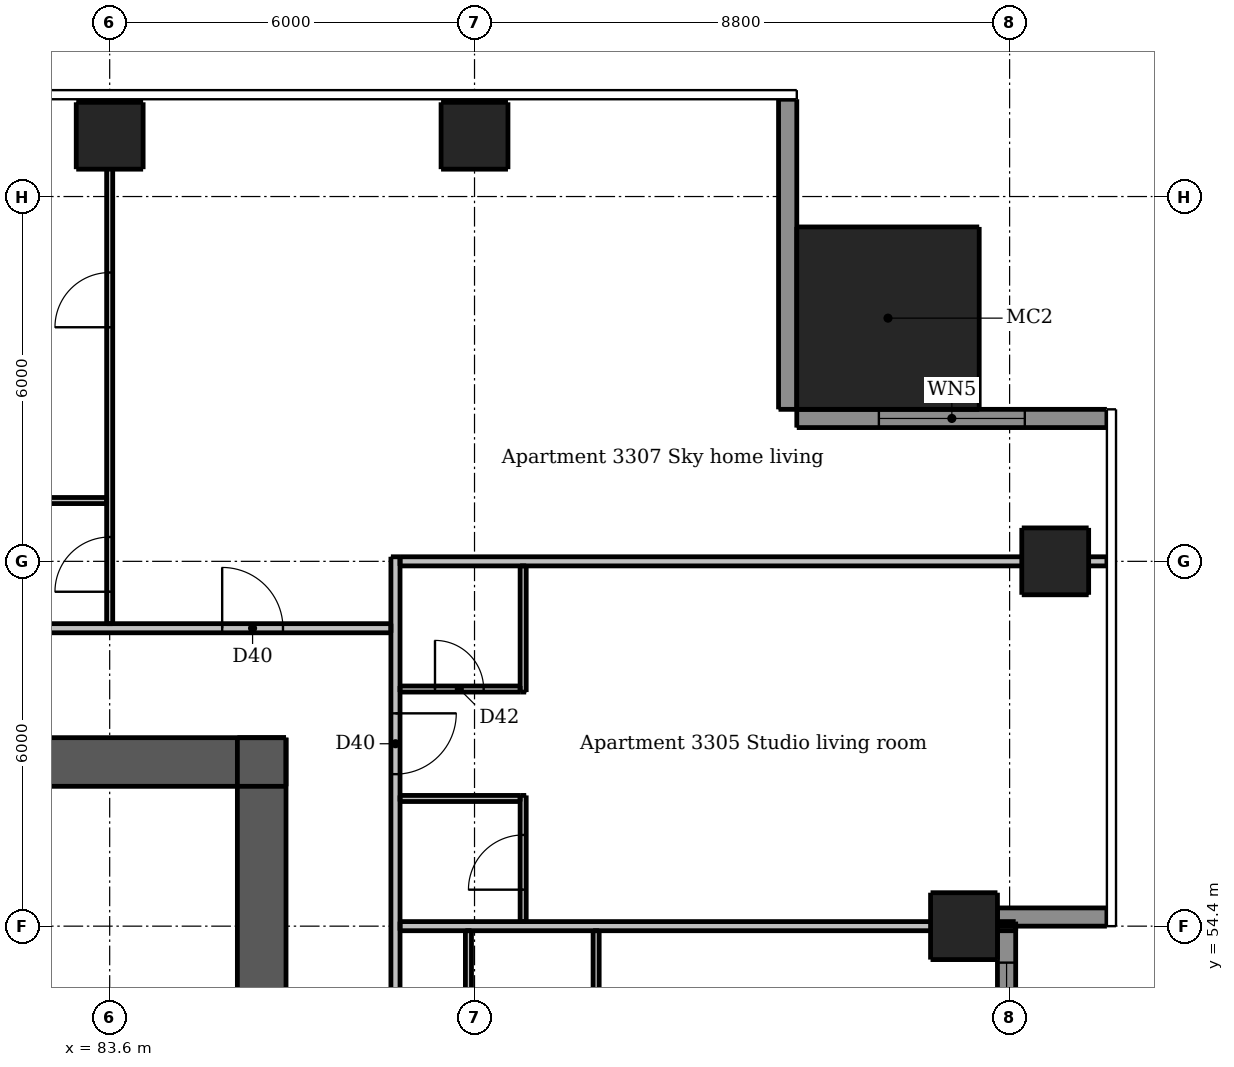
"""IFC4 building model, lengths in metres.
Left out: names, types, materials, properties, quantities, classifications, styles, units other than length and angle.
Written with IfcOpenShell. Run it as: python <this file> out.ifc"""

import sys

from ifc_helpers import new_model, si_unit, direction, frame, frame_2d, origin, origin_2d, place, context, subcontext, project, spatial, rectangle, extrude, element, fill, save


model = new_model("IFC4")
c1 = context("Model", 3, precision=1e-05, world=origin(), true_north=direction((0.0, 1.0)))
c2 = subcontext(c1, "Body", "Model", "MODEL_VIEW")
j1 = project(units=[si_unit("LENGTHUNIT", "METRE"), si_unit("PLANEANGLEUNIT", "RADIAN")], contexts=[c1])
p1 = place(None, origin())
s1 = spatial("IfcSite", under=j1, at=p1, CompositionType="ELEMENT")
p2 = place(p1, origin())
s2 = spatial("IfcBuilding", under=s1, at=p2, CompositionType="ELEMENT")
p3 = place(p2, frame((0.0, 0.0, 121.6)))
s3 = spatial("IfcBuildingStorey", under=s2, at=p3, CompositionType="ELEMENT", Elevation=121.6)
p4 = place(p3, frame((62.5, 57.1, 0.0), z_axis=(0.0, 0.0, 1.0), x_axis=(1.0, 0.0, 0.0)))
e1 = element("IfcWall", 1, at=p4, inside=s3, PredefinedType="SHEAR", context=c2, shape_type="SweptSolid", body=[
    extrude(rectangle(XDim=24.0, YDim=0.8, at=frame_2d((12.0, 0.0))), origin(), (0.0, 0.0, 1.0), 2.95),
])
p5 = place(p4, frame((20.9, 0.0, 0.0)))
e2 = element("IfcOpeningElement", 2, at=p5, cuts=e1, PredefinedType="OPENING", context=c2, shape_type="SweptSolid", body=[
    extrude(rectangle(XDim=1.1, YDim=2.1, at=frame_2d((0.55, 1.05))), frame((0.0, 0.41, 0.0), z_axis=(0.0, -1.0, 0.0), x_axis=(1.0, 0.0, 0.0)), (0.0, 0.0, 1.0), 0.82),
])
p6 = place(p4, frame((2.0, 0.0, 0.0)))
e3 = element("IfcOpeningElement", 3, at=p6, cuts=e1, PredefinedType="OPENING", context=c2, shape_type="SweptSolid", body=[
    extrude(rectangle(XDim=1.1, YDim=2.1, at=frame_2d((0.55, 1.05))), frame((0.0, 0.41, 0.0), z_axis=(0.0, -1.0, 0.0), x_axis=(1.0, 0.0, 0.0)), (0.0, 0.0, 1.0), 0.82),
])
p7 = place(p4, frame((6.075, 0.0, 0.0)))
e4 = element("IfcOpeningElement", 4, at=p7, cuts=e1, PredefinedType="OPENING", context=c2, shape_type="SweptSolid", body=[
    extrude(rectangle(XDim=0.9, YDim=2.1, at=frame_2d((0.45, 1.05))), frame((0.0, 0.41, 0.0), z_axis=(0.0, -1.0, 0.0), x_axis=(1.0, 0.0, 0.0)), (0.0, 0.0, 1.0), 0.82),
])
p8 = place(p4, frame((10.455, 0.0, 0.0)))
e5 = element("IfcOpeningElement", 5, at=p8, cuts=e1, PredefinedType="OPENING", context=c2, shape_type="SweptSolid", body=[
    extrude(rectangle(XDim=0.9, YDim=2.1, at=frame_2d((0.45, 1.05))), frame((0.0, 0.41, 0.0), z_axis=(0.0, -1.0, 0.0), x_axis=(1.0, 0.0, 0.0)), (0.0, 0.0, 1.0), 0.82),
])
p9 = place(p4, frame((15.93, 0.0, 0.0)))
e6 = element("IfcOpeningElement", 6, at=p9, cuts=e1, PredefinedType="OPENING", context=c2, shape_type="SweptSolid", body=[
    extrude(rectangle(XDim=0.9, YDim=2.1, at=frame_2d((0.45, 1.05))), frame((0.0, 0.41, 0.0), z_axis=(0.0, -1.0, 0.0), x_axis=(1.0, 0.0, 0.0)), (0.0, 0.0, 1.0), 0.82),
])
p10 = place(p3, frame((86.1, 33.5, 0.0), z_axis=(0.0, 0.0, 1.0), x_axis=(0.0, 1.0, 0.0)))
e7 = element("IfcWall", 7, at=p10, inside=s3, PredefinedType="SHEAR", context=c2, shape_type="SweptSolid", body=[
    extrude(rectangle(XDim=24.0, YDim=0.8, at=frame_2d((12.0, 0.0))), origin(), (0.0, 0.0, 1.0), 2.95),
])
p11 = place(p10, frame((11.2, 0.0, 0.0)))
e8 = element("IfcOpeningElement", 8, at=p11, cuts=e7, PredefinedType="OPENING", context=c2, shape_type="SweptSolid", body=[
    extrude(rectangle(XDim=1.6, YDim=2.1, at=frame_2d((0.8, 1.05))), frame((0.0, 0.41, 0.0), z_axis=(0.0, -1.0, 0.0), x_axis=(1.0, 0.0, 0.0)), (0.0, 0.0, 1.0), 0.82),
])
for number, where, z_axis, x_axis in (
    (9, (97.65, 54.4, 0.0), (0.0, 0.0, 1.0), (1.0, 0.0, 0.0)),
    (10, (99.15, 60.4, 0.0), (0.0, 0.0, 1.0), (1.0, 0.0, 0.0)),
    (11, (83.6, 67.4, 0.0), (0.0, 0.0, 1.0), (1.0, 0.0, 0.0)),
    (12, (89.6, 67.4, 0.0), (0.0, 0.0, 1.0), (1.0, 0.0, 0.0)),
):
    element("IfcColumn", number, at=place(p3, frame(where, z_axis=z_axis, x_axis=x_axis)), inside=s3, PredefinedType="COLUMN", context=c2, shape_type="SweptSolid", body=[
        extrude(rectangle(XDim=1.1, YDim=1.1, at=origin_2d()), origin(), (0.0, 0.0, 1.0), 2.95),
    ])
p12 = place(p3, frame((96.4, 64.4, 0.0), z_axis=(0.0, 0.0, 1.0), x_axis=(1.0, 0.0, 0.0)))
e13 = element("IfcColumn", 13, at=p12, inside=s3, PredefinedType="COLUMN", context=c2, shape_type="SweptSolid", body=[
    extrude(rectangle(XDim=3.0, YDim=3.0, at=origin_2d()), origin(), (0.0, 0.0, 1.0), 3.3),
])
p13 = place(p3, frame((98.2, 54.55, 0.0), z_axis=(0.0, 0.0, 1.0), x_axis=(1.0, 0.0, 0.0)))
e14 = element("IfcWall", 14, at=p13, inside=s3, PredefinedType="SOLIDWALL", context=c2, shape_type="SweptSolid", body=[
    extrude(rectangle(XDim=1.8, YDim=0.3, at=frame_2d((0.9, 0.0))), origin(), (0.0, 0.0, 1.0), 2.95),
])
p14 = place(p3, frame((100.0, 62.75, 0.0), z_axis=(0.0, 0.0, 1.0), x_axis=(-1.0, 0.0, 0.0)))
e15 = element("IfcWall", 15, at=p14, inside=s3, PredefinedType="SOLIDWALL", context=c2, shape_type="SweptSolid", body=[
    extrude(rectangle(XDim=5.1, YDim=0.3, at=frame_2d((2.55, 0.0))), origin(), (0.0, 0.0, 1.0), 2.95),
])
p15 = place(p14, frame((1.35, 0.0, 0.15)))
e16 = element("IfcOpeningElement", 16, at=p15, cuts=e15, PredefinedType="OPENING", context=c2, shape_type="SweptSolid", body=[
    extrude(rectangle(XDim=2.4, YDim=2.1, at=frame_2d((1.2, 1.05))), frame((0.0, 0.16, 0.0), z_axis=(0.0, -1.0, 0.0), x_axis=(1.0, 0.0, 0.0)), (0.0, 0.0, 1.0), 0.32),
])
p16 = place(p3, frame((94.75, 62.9, 0.0), z_axis=(0.0, 0.0, 1.0), x_axis=(0.0, 1.0, 0.0)))
e17 = element("IfcWall", 17, at=p16, inside=s3, PredefinedType="SOLIDWALL", context=c2, shape_type="SweptSolid", body=[
    extrude(rectangle(XDim=5.1, YDim=0.3, at=frame_2d((2.55, 0.0))), origin(), (0.0, 0.0, 1.0), 2.95),
])
p17 = place(p3, frame((98.35, 48.4, 0.0), z_axis=(0.0, 0.0, 1.0), x_axis=(0.0, 1.0, 0.0)))
e18 = element("IfcWall", 18, at=p17, inside=s3, PredefinedType="SOLIDWALL", context=c2, shape_type="SweptSolid", body=[
    extrude(rectangle(XDim=6.0, YDim=0.3, at=frame_2d((3.0, 0.0))), origin(), (0.0, 0.0, 1.0), 2.34),
])
p18 = place(p17, frame((0.6, 0.0, 0.15)))
e19 = element("IfcOpeningElement", 19, at=p18, cuts=e18, PredefinedType="OPENING", context=c2, shape_type="SweptSolid", body=[
    extrude(rectangle(XDim=1.8, YDim=2.1, at=frame_2d((0.9, 1.05))), frame((0.0, 0.16, 0.0), z_axis=(0.0, -1.0, 0.0), x_axis=(1.0, 0.0, 0.0)), (0.0, 0.0, 1.0), 0.32),
])
p19 = place(p17, frame((3.6, 0.0, 0.15)))
e20 = element("IfcOpeningElement", 20, at=p19, cuts=e18, PredefinedType="OPENING", context=c2, shape_type="SweptSolid", body=[
    extrude(rectangle(XDim=1.8, YDim=2.1, at=frame_2d((0.9, 1.05))), frame((0.0, 0.16, 0.0), z_axis=(0.0, -1.0, 0.0), x_axis=(1.0, 0.0, 0.0)), (0.0, 0.0, 1.0), 0.32),
])
p20 = place(p3, frame((83.6, 59.375, 0.0), z_axis=(0.0, 0.0, 1.0), x_axis=(0.0, 1.0, 0.0)))
e21 = element("IfcWall", 21, at=p20, inside=s3, PredefinedType="PARTITIONING", context=c2, shape_type="SweptSolid", body=[
    extrude(rectangle(XDim=8.625, YDim=0.1, at=frame_2d((4.312, 0.0))), origin(), (0.0, 0.0, 1.0), 2.332),
])
p21 = place(p20, frame((0.525, 0.0, 0.0)))
e22 = element("IfcOpeningElement", 22, at=p21, cuts=e21, PredefinedType="OPENING", context=c2, shape_type="SweptSolid", body=[
    extrude(rectangle(XDim=0.9, YDim=2.1, at=frame_2d((0.45, 1.05))), frame((0.0, 0.06, 0.0), z_axis=(0.0, -1.0, 0.0), x_axis=(1.0, 0.0, 0.0)), (0.0, 0.0, 1.0), 0.12),
])
p22 = place(p20, frame((4.875, 0.0, 0.0)))
e23 = element("IfcOpeningElement", 23, at=p22, cuts=e21, PredefinedType="OPENING", context=c2, shape_type="SweptSolid", body=[
    extrude(rectangle(XDim=0.9, YDim=2.1, at=frame_2d((0.45, 1.05))), frame((0.0, 0.06, 0.0), z_axis=(0.0, -1.0, 0.0), x_axis=(1.0, 0.0, 0.0)), (0.0, 0.0, 1.0), 0.12),
])
p23 = place(p3, frame((89.5, 54.325, 0.0), z_axis=(0.0, 0.0, 1.0), x_axis=(0.0, -1.0, 0.0)))
e24 = element("IfcWall", 24, at=p23, inside=s3, PredefinedType="PARTITIONING", context=c2, shape_type="SweptSolid", body=[
    extrude(rectangle(XDim=14.85, YDim=0.1, at=frame_2d((7.425, 0.0))), origin(), (0.0, 0.0, 1.0), 2.95),
])
p24 = place(p23, frame((5.775, 0.0, 0.0)))
e25 = element("IfcOpeningElement", 25, at=p24, cuts=e24, PredefinedType="OPENING", context=c2, shape_type="SweptSolid", body=[
    extrude(rectangle(XDim=0.9, YDim=2.1, at=frame_2d((0.45, 1.05))), frame((0.0, 0.06, 0.0), z_axis=(0.0, -1.0, 0.0), x_axis=(1.0, 0.0, 0.0)), (0.0, 0.0, 1.0), 0.12),
])
p25 = place(p23, frame((0.975, 0.0, 0.0)))
e26 = element("IfcOpeningElement", 26, at=p25, cuts=e24, PredefinedType="OPENING", context=c2, shape_type="SweptSolid", body=[
    extrude(rectangle(XDim=0.9, YDim=2.1, at=frame_2d((0.45, 1.05))), frame((0.0, 0.06, 0.0), z_axis=(0.0, -1.0, 0.0), x_axis=(1.0, 0.0, 0.0)), (0.0, 0.0, 1.0), 0.12),
])
p26 = place(p23, frame((12.975, 0.0, 0.0)))
e27 = element("IfcOpeningElement", 27, at=p26, cuts=e24, PredefinedType="OPENING", context=c2, shape_type="SweptSolid", body=[
    extrude(rectangle(XDim=0.9, YDim=2.1, at=frame_2d((0.45, 1.05))), frame((0.0, 0.06, 0.0), z_axis=(0.0, -1.0, 0.0), x_axis=(1.0, 0.0, 0.0)), (0.0, 0.0, 1.0), 0.12),
])
p27 = place(p23, frame((10.325, 0.0, 0.0)))
e28 = element("IfcOpeningElement", 28, at=p27, cuts=e24, PredefinedType="OPENING", context=c2, shape_type="SweptSolid", body=[
    extrude(rectangle(XDim=0.8, YDim=2.1, at=frame_2d((0.4, 1.05))), frame((0.0, 0.06, 0.0), z_axis=(0.0, -1.0, 0.0), x_axis=(1.0, 0.0, 0.0)), (0.0, 0.0, 1.0), 0.12),
])
p28 = place(p3, frame((90.4, 54.475, 0.0), z_axis=(0.0, 0.0, 1.0), x_axis=(0.0, 1.0, 0.0)))
e29 = element("IfcWall", 29, at=p28, inside=s3, PredefinedType="PARTITIONING", context=c2, shape_type="SweptSolid", body=[
    extrude(rectangle(XDim=2.075, YDim=0.1, at=frame_2d((1.038, 0.0))), origin(), (0.0, 0.0, 1.0), 2.95),
])
p29 = place(p28, frame((0.525, 0.0, 0.0)))
e30 = element("IfcOpeningElement", 30, at=p29, cuts=e29, PredefinedType="OPENING", context=c2, shape_type="SweptSolid", body=[
    extrude(rectangle(XDim=0.9, YDim=2.1, at=frame_2d((0.45, 1.05))), frame((0.0, 0.06, 0.0), z_axis=(0.0, -1.0, 0.0), x_axis=(1.0, 0.0, 0.0)), (0.0, 0.0, 1.0), 0.12),
])
p30 = place(p3, frame((90.4, 58.25, 0.0), z_axis=(0.0, 0.0, 1.0), x_axis=(0.0, 1.0, 0.0)))
e31 = element("IfcWall", 31, at=p30, inside=s3, PredefinedType="PARTITIONING", context=c2, shape_type="SweptSolid", body=[
    extrude(rectangle(XDim=2.075, YDim=0.1, at=frame_2d((1.038, 0.0))), origin(), (0.0, 0.0, 1.0), 2.95),
])
p31 = place(p3, frame((91.6, 51.35, 0.0), z_axis=(0.0, 0.0, 1.0), x_axis=(0.0, 1.0, 0.0)))
e32 = element("IfcWall", 32, at=p31, inside=s3, PredefinedType="PARTITIONING", context=c2, shape_type="SweptSolid", body=[
    extrude(rectangle(XDim=2.975, YDim=0.1, at=frame_2d((1.487, 0.0))), origin(), (0.0, 0.0, 1.0), 2.95),
])
p32 = place(p3, frame((83.55, 61.4, 0.0), z_axis=(0.0, 0.0, 1.0), x_axis=(-1.0, 0.0, 0.0)))
e33 = element("IfcWall", 33, at=p32, inside=s3, PredefinedType="PARTITIONING", context=c2, shape_type="SweptSolid", body=[
    extrude(rectangle(XDim=5.875, YDim=0.1, at=frame_2d((2.938, 0.0))), origin(), (0.0, 0.0, 1.0), 2.95),
])
p33 = place(p32, frame((3.75, 0.0, 0.0)))
e34 = element("IfcOpeningElement", 34, at=p33, cuts=e33, PredefinedType="OPENING", context=c2, shape_type="SweptSolid", body=[
    extrude(rectangle(XDim=0.8, YDim=2.1, at=frame_2d((0.4, 1.05))), frame((0.0, 0.06, 0.0), z_axis=(0.0, -1.0, 0.0), x_axis=(1.0, 0.0, 0.0)), (0.0, 0.0, 1.0), 0.12),
])
p34 = place(p3, frame((88.375, 58.3, 0.0), z_axis=(0.0, 0.0, 1.0), x_axis=(1.0, 0.0, 0.0)))
e35 = element("IfcWall", 35, at=p34, inside=s3, PredefinedType="PARTITIONING", context=c2, shape_type="SweptSolid", body=[
    extrude(rectangle(XDim=1.975, YDim=0.1, at=frame_2d((0.988, 0.0))), origin(), (0.0, 0.0, 1.0), 2.95),
])
p35 = place(p34, frame((0.575, 0.0, 0.0)))
e36 = element("IfcOpeningElement", 36, at=p35, cuts=e35, PredefinedType="OPENING", context=c2, shape_type="SweptSolid", body=[
    extrude(rectangle(XDim=0.8, YDim=2.1, at=frame_2d((0.4, 1.05))), frame((0.0, 0.06, 0.0), z_axis=(0.0, -1.0, 0.0), x_axis=(1.0, 0.0, 0.0)), (0.0, 0.0, 1.0), 0.12),
])
p36 = place(p3, frame((88.375, 56.5, 0.0), z_axis=(0.0, 0.0, 1.0), x_axis=(1.0, 0.0, 0.0)))
e37 = element("IfcWall", 37, at=p36, inside=s3, PredefinedType="PARTITIONING", context=c2, shape_type="SweptSolid", body=[
    extrude(rectangle(XDim=1.975, YDim=0.1, at=frame_2d((0.988, 0.0))), origin(), (0.0, 0.0, 1.0), 2.95),
])
p37 = place(p3, frame((88.3, 60.475, 0.0), z_axis=(0.0, 0.0, 1.0), x_axis=(0.0, -1.0, 0.0)))
e38 = element("IfcWall", 38, at=p37, inside=s3, PredefinedType="PARTITIONING", context=c2, shape_type="SweptSolid", body=[
    extrude(rectangle(XDim=28.7, YDim=0.15, at=frame_2d((14.35, 0.0))), origin(), (0.0, 0.0, 1.0), 2.95),
])
p38 = place(p37, frame((27.425, 0.0, 0.0)))
e39 = element("IfcOpeningElement", 39, at=p38, cuts=e38, PredefinedType="OPENING", context=c2, shape_type="SweptSolid", body=[
    extrude(rectangle(XDim=1.0, YDim=2.1, at=frame_2d((0.5, 1.05))), frame((0.0, 0.085, 0.0), z_axis=(0.0, -1.0, 0.0), x_axis=(1.0, 0.0, 0.0)), (0.0, 0.0, 1.0), 0.17),
])
p39 = place(p37, frame((13.075, 0.0, 0.0)))
e40 = element("IfcOpeningElement", 40, at=p39, cuts=e38, PredefinedType="OPENING", context=c2, shape_type="SweptSolid", body=[
    extrude(rectangle(XDim=1.0, YDim=2.1, at=frame_2d((0.5, 1.05))), frame((0.0, 0.085, 0.0), z_axis=(0.0, -1.0, 0.0), x_axis=(1.0, 0.0, 0.0)), (0.0, 0.0, 1.0), 0.17),
])
p40 = place(p37, frame((2.575, 0.0, 0.0)))
e41 = element("IfcOpeningElement", 41, at=p40, cuts=e38, PredefinedType="OPENING", context=c2, shape_type="SweptSolid", body=[
    extrude(rectangle(XDim=1.0, YDim=2.1, at=frame_2d((0.5, 1.05))), frame((0.0, 0.085, 0.0), z_axis=(0.0, -1.0, 0.0), x_axis=(1.0, 0.0, 0.0)), (0.0, 0.0, 1.0), 0.17),
])
p41 = place(p3, frame((88.375, 60.4, 0.0), z_axis=(0.0, 0.0, 1.0), x_axis=(1.0, 0.0, 0.0)))
e42 = element("IfcWall", 42, at=p41, inside=s3, PredefinedType="PARTITIONING", context=c2, shape_type="SweptSolid", body=[
    extrude(rectangle(XDim=11.625, YDim=0.15, at=frame_2d((5.812, 0.0))), origin(), (0.0, 0.0, 1.0), 2.332),
])
p42 = place(p3, frame((59.675, 59.3, 0.0), z_axis=(0.0, 0.0, 1.0), x_axis=(1.0, 0.0, 0.0)))
e43 = element("IfcWall", 43, at=p42, inside=s3, PredefinedType="PARTITIONING", context=c2, shape_type="SweptSolid", body=[
    extrude(rectangle(XDim=28.55, YDim=0.15, at=frame_2d((14.275, 0.0))), origin(), (0.0, 0.0, 1.0), 2.95),
])
p43 = place(p42, frame((8.975, 0.0, 0.0)))
e44 = element("IfcOpeningElement", 44, at=p43, cuts=e43, PredefinedType="OPENING", context=c2, shape_type="SweptSolid", body=[
    extrude(rectangle(XDim=1.0, YDim=2.1, at=frame_2d((0.5, 1.05))), frame((0.0, 0.085, 0.0), z_axis=(0.0, -1.0, 0.0), x_axis=(1.0, 0.0, 0.0)), (0.0, 0.0, 1.0), 0.17),
])
p44 = place(p42, frame((25.775, 0.0, 0.0)))
e45 = element("IfcOpeningElement", 45, at=p44, cuts=e43, PredefinedType="OPENING", context=c2, shape_type="SweptSolid", body=[
    extrude(rectangle(XDim=1.0, YDim=2.1, at=frame_2d((0.5, 1.05))), frame((0.0, 0.085, 0.0), z_axis=(0.0, -1.0, 0.0), x_axis=(1.0, 0.0, 0.0)), (0.0, 0.0, 1.0), 0.17),
])
p45 = place(p3, frame((88.375, 54.4, 0.0), z_axis=(0.0, 0.0, 1.0), x_axis=(1.0, 0.0, 0.0)))
e46 = element("IfcWall", 46, at=p45, inside=s3, PredefinedType="PARTITIONING", context=c2, shape_type="SweptSolid", body=[
    extrude(rectangle(XDim=10.125, YDim=0.15, at=frame_2d((5.062, 0.0))), origin(), (0.0, 0.0, 1.0), 2.332),
])
p46 = place(p15, origin())
e47 = element("IfcWindow", 47, at=p46, inside=s3, PartitioningType="DOUBLE_PANEL_VERTICAL", PredefinedType="WINDOW", context=c2, shape_type="SweptSolid", body=[
    extrude(rectangle(XDim=2.4, YDim=2.1, at=frame_2d((1.2, 1.05))), frame((0.0, 0.03, 0.0), z_axis=(0.0, -1.0, 0.0), x_axis=(1.0, 0.0, 0.0)), (0.0, 0.0, 1.0), 0.06),
])
fill(e16, e47)
p47 = place(p19, origin())
e48 = element("IfcWindow", 48, at=p47, inside=s3, PartitioningType="DOUBLE_PANEL_VERTICAL", PredefinedType="WINDOW", context=c2, shape_type="SweptSolid", body=[
    extrude(rectangle(XDim=1.8, YDim=2.1, at=frame_2d((0.9, 1.05))), frame((0.0, 0.03, 0.0), z_axis=(0.0, -1.0, 0.0), x_axis=(1.0, 0.0, 0.0)), (0.0, 0.0, 1.0), 0.06),
])
fill(e20, e48)
p48 = place(p5, origin())
e49 = element("IfcDoor", 49, at=p48, inside=s3, OperationType="SINGLE_SWING_RIGHT", PredefinedType="DOOR", context=c2, shape_type="SweptSolid", body=[
    extrude(rectangle(XDim=1.1, YDim=2.1, at=frame_2d((0.55, 1.05))), frame((0.0, -0.337, 0.0), z_axis=(0.0, -1.0, 0.0), x_axis=(1.0, 0.0, 0.0)), (0.0, 0.0, 1.0), 0.05),
])
fill(e2, e49)
p49 = place(p40, origin())
e50 = element("IfcDoor", 50, at=p49, inside=s3, OperationType="SINGLE_SWING_LEFT", PredefinedType="DOOR", context=c2, shape_type="SweptSolid", body=[
    extrude(rectangle(XDim=1.0, YDim=2.1, at=frame_2d((0.5, 1.05))), frame((0.0, 0.025, 0.0), z_axis=(0.0, -1.0, 0.0), x_axis=(1.0, 0.0, 0.0)), (0.0, 0.0, 1.0), 0.05),
])
fill(e41, e50)
p50 = place(p29, origin())
e51 = element("IfcDoor", 51, at=p50, inside=s3, OperationType="SINGLE_SWING_LEFT", PredefinedType="DOOR", context=c2, shape_type="SweptSolid", body=[
    extrude(rectangle(XDim=0.9, YDim=2.1, at=frame_2d((0.45, 1.05))), frame((0.0, 0.025, 0.0), z_axis=(0.0, -1.0, 0.0), x_axis=(1.0, 0.0, 0.0)), (0.0, 0.0, 1.0), 0.05),
])
fill(e30, e51)
p51 = place(p35, origin())
e52 = element("IfcDoor", 52, at=p51, inside=s3, OperationType="SINGLE_SWING_LEFT", PredefinedType="DOOR", context=c2, shape_type="SweptSolid", body=[
    extrude(rectangle(XDim=0.8, YDim=2.1, at=frame_2d((0.4, 1.05))), frame((0.0, 0.025, 0.0), z_axis=(0.0, -1.0, 0.0), x_axis=(1.0, 0.0, 0.0)), (0.0, 0.0, 1.0), 0.05),
])
fill(e36, e52)
p52 = place(p44, origin())
e53 = element("IfcDoor", 53, at=p52, inside=s3, OperationType="SINGLE_SWING_LEFT", PredefinedType="DOOR", context=c2, shape_type="SweptSolid", body=[
    extrude(rectangle(XDim=1.0, YDim=2.1, at=frame_2d((0.5, 1.05))), frame((0.0, 0.025, 0.0), z_axis=(0.0, -1.0, 0.0), x_axis=(1.0, 0.0, 0.0)), (0.0, 0.0, 1.0), 0.05),
])
fill(e45, e53)
p53 = place(p21, origin())
e54 = element("IfcDoor", 54, at=p53, inside=s3, OperationType="SINGLE_SWING_LEFT", PredefinedType="DOOR", context=c2, shape_type="SweptSolid", body=[
    extrude(rectangle(XDim=0.9, YDim=2.1, at=frame_2d((0.45, 1.05))), frame((0.0, 0.025, 0.0), z_axis=(0.0, -1.0, 0.0), x_axis=(1.0, 0.0, 0.0)), (0.0, 0.0, 1.0), 0.05),
])
fill(e22, e54)
p54 = place(p22, origin())
e55 = element("IfcDoor", 55, at=p54, inside=s3, OperationType="SINGLE_SWING_LEFT", PredefinedType="DOOR", context=c2, shape_type="SweptSolid", body=[
    extrude(rectangle(XDim=0.9, YDim=2.1, at=frame_2d((0.45, 1.05))), frame((0.0, 0.025, 0.0), z_axis=(0.0, -1.0, 0.0), x_axis=(1.0, 0.0, 0.0)), (0.0, 0.0, 1.0), 0.05),
])
fill(e23, e55)
save(model, sys.argv[1])
